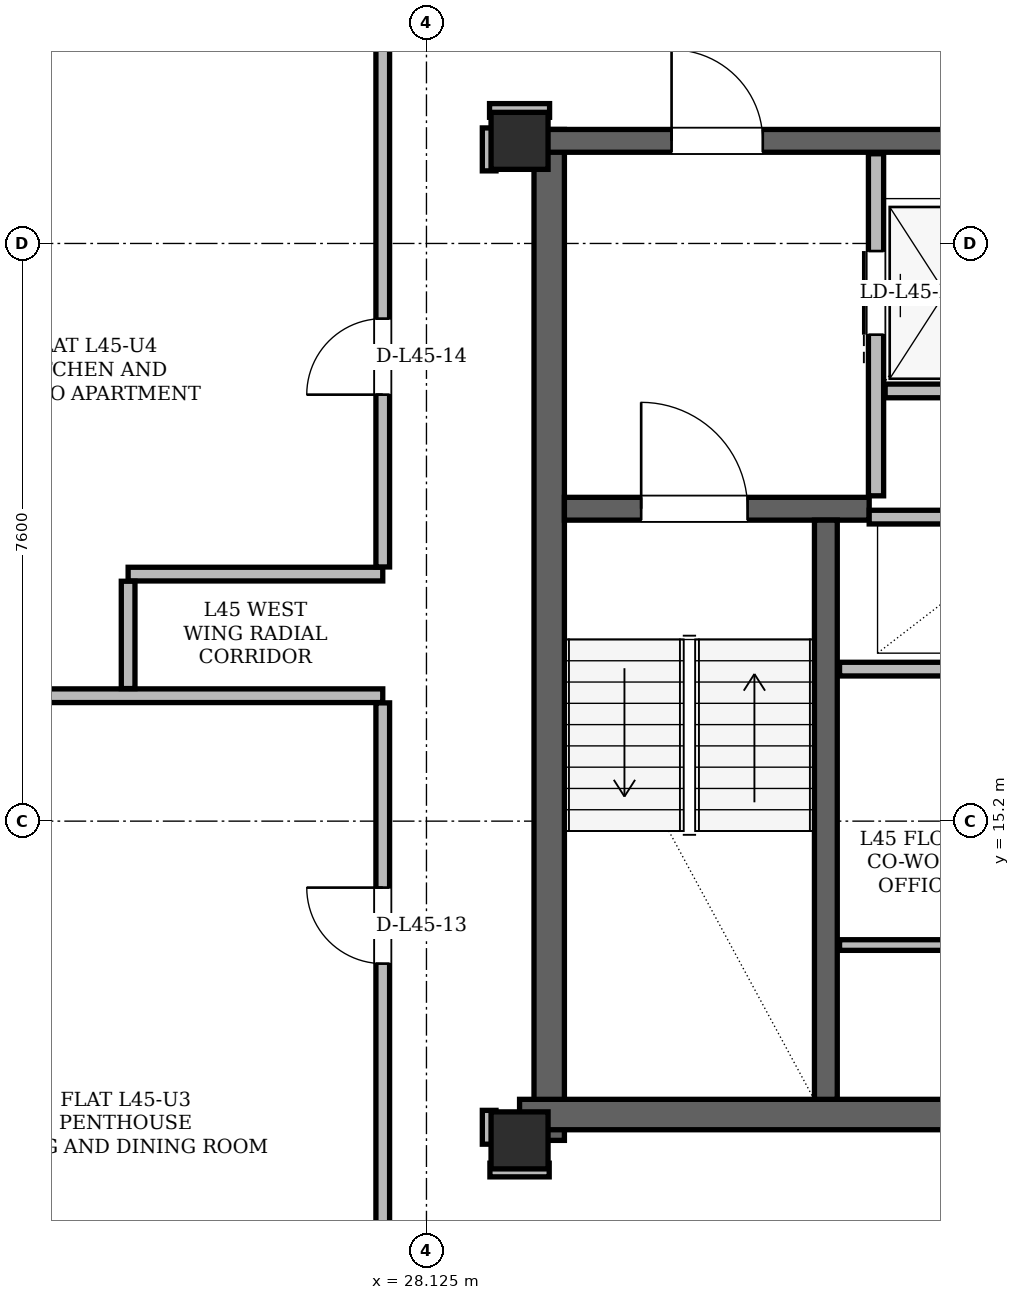
"""IFC4 building model, lengths in metres.
Left out: names, types, materials, properties, quantities, classifications, styles, units other than length and angle.
Written with IfcOpenShell. Run it as: python <this file> out.ifc"""

import sys

from ifc_helpers import new_model, si_unit, direction, frame, frame_2d, origin, origin_2d, place, context, subcontext, project, spatial, rectangle, hollow_rectangle, extrude, element, fill, save


model = new_model("IFC4")
c1 = context("Model", 3, precision=1e-05, world=origin(), true_north=direction((0.0, 1.0)))
c2 = subcontext(c1, "Body", "Model", "MODEL_VIEW")
j1 = project(units=[si_unit("LENGTHUNIT", "METRE"), si_unit("PLANEANGLEUNIT", "RADIAN")], contexts=[c1])
p1 = place(None, origin())
s1 = spatial("IfcSite", under=j1, at=p1, CompositionType="ELEMENT")
p2 = place(p1, origin())
s2 = spatial("IfcBuilding", under=s1, at=p2, CompositionType="ELEMENT")
p3 = place(p2, frame((0.0, 0.0, 171.0)))
s3 = spatial("IfcBuildingStorey", under=s2, at=p3, CompositionType="ELEMENT", Elevation=171.0)
for number, where, z_axis, x_axis in (
    (1, (29.35, 11.0, 0.0), (0.0, 0.0, 1.0), (1.0, 0.0, 0.0)),
    (2, (29.35, 24.15, 0.0), (0.0, 0.0, 1.0), (1.0, 0.0, 0.0)),
):
    element("IfcColumn", number, at=place(p3, frame(where, z_axis=z_axis, x_axis=x_axis)), inside=s3, PredefinedType="COLUMN", context=c2, shape_type="SweptSolid", body=[
        extrude(hollow_rectangle(XDim=0.75, YDim=0.75, WallThickness=0.06, at=origin_2d()), origin(), (0.0, 0.0, 1.0), 3.6),
    ])
p4 = place(p3, frame((29.74, 11.0, 0.0), z_axis=(0.0, 0.0, 1.0), x_axis=(0.0, 1.0, 0.0)))
e3 = element("IfcWall", 3, at=p4, inside=s3, PredefinedType="SHEAR", context=c2, shape_type="SweptSolid", body=[
    extrude(rectangle(XDim=13.3, YDim=0.4, at=frame_2d((6.65, 0.0))), origin(), (0.0, 0.0, 1.0), 3.38),
])
p5 = place(p3, frame((29.35, 11.34, 0.0), z_axis=(0.0, 0.0, 1.0), x_axis=(1.0, 0.0, 0.0)))
e4 = element("IfcWall", 4, at=p5, inside=s3, PredefinedType="SHEAR", context=c2, shape_type="SweptSolid", body=[
    extrude(rectangle(XDim=7.1, YDim=0.4, at=frame_2d((3.55, 0.0))), origin(), (0.0, 0.0, 1.0), 3.38),
])
p6 = place(p3, frame((29.65, 24.15, 0.0), z_axis=(0.0, 0.0, 1.0), x_axis=(1.0, 0.0, 0.0)))
e5 = element("IfcWall", 5, at=p6, inside=s3, PredefinedType="SHEAR", context=c2, shape_type="SweptSolid", body=[
    extrude(rectangle(XDim=15.7, YDim=0.3, at=frame_2d((7.85, 0.0))), origin(), (0.0, 0.0, 1.0), 3.38),
])
p7 = place(p6, frame((1.7, 0.0, 0.0)))
e6 = element("IfcOpeningElement", 6, at=p7, cuts=e5, PredefinedType="OPENING", context=c2, shape_type="SweptSolid", body=[
    extrude(rectangle(XDim=1.2, YDim=2.2, at=frame_2d((0.6, 1.1))), frame((0.0, 0.15, 0.0), z_axis=(0.0, -1.0, 0.0), x_axis=(1.0, 0.0, 0.0)), (0.0, 0.0, 1.0), 0.3),
])
p8 = place(p6, frame((12.8, 0.0, 0.0)))
e7 = element("IfcOpeningElement", 7, at=p8, cuts=e5, PredefinedType="OPENING", context=c2, shape_type="SweptSolid", body=[
    extrude(rectangle(XDim=1.2, YDim=2.2, at=frame_2d((0.6, 1.1))), frame((0.0, 0.15, 0.0), z_axis=(0.0, -1.0, 0.0), x_axis=(1.0, 0.0, 0.0)), (0.0, 0.0, 1.0), 0.3),
])
p9 = place(p6, frame((7.4, 0.0, 0.0)))
e8 = element("IfcOpeningElement", 8, at=p9, cuts=e5, PredefinedType="OPENING", context=c2, shape_type="SweptSolid", body=[
    extrude(rectangle(XDim=0.9, YDim=2.05, at=frame_2d((0.45, 1.025))), frame((0.0, 0.15, 0.0), z_axis=(0.0, -1.0, 0.0), x_axis=(1.0, 0.0, 0.0)), (0.0, 0.0, 1.0), 0.3),
])
p10 = place(p3, frame((29.94, 19.31, 0.0), z_axis=(0.0, 0.0, 1.0), x_axis=(1.0, 0.0, 0.0)))
e9 = element("IfcWall", 9, at=p10, inside=s3, PredefinedType="SHEAR", context=c2, shape_type="SweptSolid", body=[
    extrude(rectangle(XDim=4.01, YDim=0.3, at=frame_2d((2.005, 0.0))), origin(), (0.0, 0.0, 1.0), 3.38),
])
p11 = place(p10, frame((1.01, 0.0, 0.0)))
e10 = element("IfcOpeningElement", 10, at=p11, cuts=e9, PredefinedType="OPENING", context=c2, shape_type="SweptSolid", body=[
    extrude(rectangle(XDim=1.4, YDim=2.2, at=frame_2d((0.7, 1.1))), frame((0.0, 0.15, 0.0), z_axis=(0.0, -1.0, 0.0), x_axis=(1.0, 0.0, 0.0)), (0.0, 0.0, 1.0), 0.3),
])
p12 = place(p3, frame((33.38, 11.54, 0.0), z_axis=(0.0, 0.0, 1.0), x_axis=(0.0, 1.0, 0.0)))
e11 = element("IfcWall", 11, at=p12, inside=s3, PredefinedType="SHEAR", context=c2, shape_type="SweptSolid", body=[
    extrude(rectangle(XDim=7.62, YDim=0.3, at=frame_2d((3.81, 0.0))), origin(), (0.0, 0.0, 1.0), 3.38),
])
p13 = place(p3, frame((33.226, 43.275, 0.0), z_axis=(0.0, 0.0, 1.0), x_axis=(-0.499997229411, -0.866027003379, 0.0)))
e12 = element("IfcWall", 12, at=p13, inside=s3, PredefinedType="SOLIDWALL", context=c2, shape_type="SweptSolid", body=[
    extrude(rectangle(XDim=35.866, YDim=0.29, at=frame_2d((17.933, 0.0))), origin(), (0.0, 0.0, 1.0), 2.6),
])
p14 = place(p13, frame((8.034, 0.0, 0.0)))
e13 = element("IfcOpeningElement", 13, at=p14, cuts=e12, PredefinedType="OPENING", context=c2, shape_type="SweptSolid", body=[
    extrude(rectangle(XDim=1.5, YDim=2.2, at=frame_2d((0.75, 1.1))), frame((0.0, 0.145, 0.0), z_axis=(0.0, -1.0, 0.0), x_axis=(1.0, 0.0, 0.0)), (0.0, 0.0, 1.0), 0.29),
])
p15 = place(p13, frame((27.787, 0.0, 0.0)))
e14 = element("IfcOpeningElement", 14, at=p15, cuts=e12, PredefinedType="OPENING", context=c2, shape_type="SweptSolid", body=[
    extrude(rectangle(XDim=1.5, YDim=2.2, at=frame_2d((0.75, 1.1))), frame((0.0, 0.145, 0.0), z_axis=(0.0, -1.0, 0.0), x_axis=(1.0, 0.0, 0.0)), (0.0, 0.0, 1.0), 0.29),
])
p16 = place(p13, frame((33.63, 0.0, 0.85)))
e15 = element("IfcOpeningElement", 15, at=p16, cuts=e12, PredefinedType="OPENING", context=c2, shape_type="SweptSolid", body=[
    extrude(rectangle(XDim=1.2, YDim=1.48, at=frame_2d((0.6, 0.74))), frame((0.0, 0.145, 0.0), z_axis=(0.0, -1.0, 0.0), x_axis=(1.0, 0.0, 0.0)), (0.0, 0.0, 1.0), 0.29),
])
p17 = place(p13, frame((18.03, 0.0, 0.85)))
e16 = element("IfcOpeningElement", 16, at=p17, cuts=e12, PredefinedType="OPENING", context=c2, shape_type="SweptSolid", body=[
    extrude(rectangle(XDim=2.6, YDim=1.64, at=frame_2d((1.3, 0.82))), frame((0.0, 0.145, 0.0), z_axis=(0.0, -1.0, 0.0), x_axis=(1.0, 0.0, 0.0)), (0.0, 0.0, 1.0), 0.29),
])
p18 = place(p13, frame((26.121, 0.0, 0.85)))
e17 = element("IfcOpeningElement", 17, at=p18, cuts=e12, PredefinedType="OPENING", context=c2, shape_type="SweptSolid", body=[
    extrude(rectangle(XDim=1.2, YDim=1.48, at=frame_2d((0.6, 0.74))), frame((0.0, 0.145, 0.0), z_axis=(0.0, -1.0, 0.0), x_axis=(1.0, 0.0, 0.0)), (0.0, 0.0, 1.0), 0.29),
])
p19 = place(p13, frame((12.379, 0.0, 0.85)))
e18 = element("IfcOpeningElement", 18, at=p19, cuts=e12, PredefinedType="OPENING", context=c2, shape_type="SweptSolid", body=[
    extrude(rectangle(XDim=1.2, YDim=1.48, at=frame_2d((0.6, 0.74))), frame((0.0, 0.145, 0.0), z_axis=(0.0, -1.0, 0.0), x_axis=(1.0, 0.0, 0.0)), (0.0, 0.0, 1.0), 0.29),
])
p20 = place(p13, frame((14.675, 0.0, 0.85)))
e19 = element("IfcOpeningElement", 19, at=p20, cuts=e12, PredefinedType="OPENING", context=c2, shape_type="SweptSolid", body=[
    extrude(rectangle(XDim=1.8, YDim=1.64, at=frame_2d((0.9, 0.82))), frame((0.0, 0.145, 0.0), z_axis=(0.0, -1.0, 0.0), x_axis=(1.0, 0.0, 0.0)), (0.0, 0.0, 1.0), 0.29),
])
p21 = place(p13, frame((2.162, 0.0, 0.85)))
e20 = element("IfcOpeningElement", 20, at=p21, cuts=e12, PredefinedType="OPENING", context=c2, shape_type="SweptSolid", body=[
    extrude(rectangle(XDim=2.0, YDim=1.64, at=frame_2d((1.0, 0.82))), frame((0.0, 0.145, 0.0), z_axis=(0.0, -1.0, 0.0), x_axis=(1.0, 0.0, 0.0)), (0.0, 0.0, 1.0), 0.29),
])
p22 = place(p3, frame((34.04, 19.48, 0.0), z_axis=(0.0, 0.0, 1.0), x_axis=(0.0, 1.0, 0.0)))
e21 = element("IfcWall", 21, at=p22, inside=s3, PredefinedType="PARTITIONING", context=c2, shape_type="SweptSolid", body=[
    extrude(rectangle(XDim=4.5, YDim=0.2, at=frame_2d((2.25, 0.0))), origin(), (0.0, 0.0, 1.0), 3.38),
])
p23 = place(p22, frame((2.12, 0.0, 0.0)))
e22 = element("IfcOpeningElement", 22, at=p23, cuts=e21, PredefinedType="OPENING", context=c2, shape_type="SweptSolid", body=[
    extrude(rectangle(XDim=1.1, YDim=2.2, at=frame_2d((0.55, 1.1))), frame((0.0, 0.1, 0.0), z_axis=(0.0, -1.0, 0.0), x_axis=(1.0, 0.0, 0.0)), (0.0, 0.0, 1.0), 0.2),
])
p24 = place(p3, frame((34.16, 20.86, 0.0), z_axis=(0.0, 0.0, 1.0), x_axis=(1.0, 0.0, 0.0)))
e23 = element("IfcWall", 23, at=p24, inside=s3, PredefinedType="PARTITIONING", context=c2, shape_type="SweptSolid", body=[
    extrude(rectangle(XDim=1.58, YDim=0.18, at=frame_2d((0.79, 0.0))), origin(), (0.0, 0.0, 1.0), 3.38),
])
p25 = place(p3, frame((33.95, 19.2, 0.0), z_axis=(0.0, 0.0, 1.0), x_axis=(1.0, 0.0, 0.0)))
e24 = element("IfcWall", 24, at=p25, inside=s3, PredefinedType="PARTITIONING", context=c2, shape_type="SweptSolid", body=[
    extrude(rectangle(XDim=2.27, YDim=0.18, at=frame_2d((1.135, 0.0))), origin(), (0.0, 0.0, 1.0), 3.38),
])
p26 = place(p3, frame((33.56, 17.2, 0.0), z_axis=(0.0, 0.0, 1.0), x_axis=(1.0, 0.0, 0.0)))
e25 = element("IfcWall", 25, at=p26, inside=s3, PredefinedType="PARTITIONING", context=c2, shape_type="SweptSolid", body=[
    extrude(rectangle(XDim=2.66, YDim=0.18, at=frame_2d((1.33, 0.0))), origin(), (0.0, 0.0, 1.0), 3.38),
])
p27 = place(p3, frame((33.56, 13.57, 0.0), z_axis=(0.0, 0.0, 1.0), x_axis=(1.0, 0.0, 0.0)))
e26 = element("IfcWall", 26, at=p27, inside=s3, PredefinedType="PARTITIONING", context=c2, shape_type="SweptSolid", body=[
    extrude(rectangle(XDim=2.66, YDim=0.14, at=frame_2d((1.33, 0.0))), origin(), (0.0, 0.0, 1.0), 3.38),
])
p28 = place(p3, frame((28.96, 10.61, 0.0), z_axis=(0.0, 0.0, 1.0), x_axis=(1.0, 0.0, 0.0)))
e27 = element("IfcWall", 27, at=p28, inside=s3, PredefinedType="PARTITIONING", context=c2, shape_type="SweptSolid", body=[
    extrude(rectangle(XDim=0.78, YDim=0.18, at=frame_2d((0.39, 0.0))), origin(), (0.0, 0.0, 1.0), 3.38),
])
p29 = place(p3, frame((18.141, 16.85, 0.0), z_axis=(0.0, 0.0, 1.0), x_axis=(1.0, 0.0, 0.0)))
e28 = element("IfcWall", 28, at=p29, inside=s3, PredefinedType="PARTITIONING", context=c2, shape_type="SweptSolid", body=[
    extrude(rectangle(XDim=9.409, YDim=0.18, at=frame_2d((4.705, 0.0))), origin(), (0.0, 0.0, 1.0), 3.38),
])
p30 = place(p3, frame((24.2, 18.45, 0.0), z_axis=(0.0, 0.0, 1.0), x_axis=(1.0, 0.0, 0.0)))
e29 = element("IfcWall", 29, at=p30, inside=s3, PredefinedType="PARTITIONING", context=c2, shape_type="SweptSolid", body=[
    extrude(rectangle(XDim=3.35, YDim=0.18, at=frame_2d((1.675, 0.0))), origin(), (0.0, 0.0, 1.0), 3.38),
])
p31 = place(p3, frame((28.955, 24.55, 0.0), z_axis=(0.0, 0.0, 1.0), x_axis=(1.0, 0.0, 0.0)))
e30 = element("IfcWall", 30, at=p31, inside=s3, PredefinedType="PARTITIONING", context=c2, shape_type="SweptSolid", body=[
    extrude(rectangle(XDim=0.79, YDim=0.18, at=frame_2d((0.395, 0.0))), origin(), (0.0, 0.0, 1.0), 2.842),
])
p32 = place(p3, frame((24.2, 16.944, 0.0), z_axis=(0.0, 0.0, 1.0), x_axis=(0.0, 1.0, 0.0)))
e31 = element("IfcWall", 31, at=p32, inside=s3, PredefinedType="PARTITIONING", context=c2, shape_type="SweptSolid", body=[
    extrude(rectangle(XDim=1.412, YDim=0.18, at=frame_2d((0.706, 0.0))), origin(), (0.0, 0.0, 1.0), 3.38),
])
p33 = place(p3, frame((27.55, 4.96, 0.0), z_axis=(0.0, 0.0, 1.0), x_axis=(0.0, 1.0, 0.0)))
e32 = element("IfcWall", 32, at=p33, inside=s3, PredefinedType="PARTITIONING", context=c2, shape_type="SweptSolid", body=[
    extrude(rectangle(XDim=11.796, YDim=0.18, at=frame_2d((5.898, 0.0))), origin(), (0.0, 0.0, 1.0), 2.842),
])
p34 = place(p33, frame((8.366, 0.0, 0.0)))
e33 = element("IfcOpeningElement", 33, at=p34, cuts=e32, PredefinedType="OPENING", context=c2, shape_type="SweptSolid", body=[
    extrude(rectangle(XDim=1.0, YDim=2.18, at=frame_2d((0.5, 1.09))), frame((0.0, 0.09, 0.0), z_axis=(0.0, -1.0, 0.0), x_axis=(1.0, 0.0, 0.0)), (0.0, 0.0, 1.0), 0.18),
])
p35 = place(p3, frame((27.55, 18.544, 0.0), z_axis=(0.0, 0.0, 1.0), x_axis=(0.0, 1.0, 0.0)))
e34 = element("IfcWall", 34, at=p35, inside=s3, PredefinedType="PARTITIONING", context=c2, shape_type="SweptSolid", body=[
    extrude(rectangle(XDim=14.603, YDim=0.18, at=frame_2d((7.302, 0.0))), origin(), (0.0, 0.0, 1.0), 3.38),
])
p36 = place(p35, frame((2.267, 0.0, 0.0)))
e35 = element("IfcOpeningElement", 35, at=p36, cuts=e34, PredefinedType="OPENING", context=c2, shape_type="SweptSolid", body=[
    extrude(rectangle(XDim=1.0, YDim=2.18, at=frame_2d((0.5, 1.09))), frame((0.0, 0.09, 0.0), z_axis=(0.0, -1.0, 0.0), x_axis=(1.0, 0.0, 0.0)), (0.0, 0.0, 1.0), 0.18),
])
p37 = place(p3, frame((28.95, 10.95, 0.0), z_axis=(0.0, 0.0, 1.0), x_axis=(0.0, 1.0, 0.0)))
e36 = element("IfcWall", 36, at=p37, inside=s3, PredefinedType="PARTITIONING", context=c2, shape_type="SweptSolid", body=[
    extrude(rectangle(XDim=0.445, YDim=0.18, at=frame_2d((0.223, 0.0))), origin(), (0.0, 0.0, 1.0), 2.842),
])
p38 = place(p3, frame((28.95, 23.755, 0.0), z_axis=(0.0, 0.0, 1.0), x_axis=(0.0, 1.0, 0.0)))
e37 = element("IfcWall", 37, at=p38, inside=s3, PredefinedType="PARTITIONING", context=c2, shape_type="SweptSolid", body=[
    extrude(rectangle(XDim=0.565, YDim=0.18, at=frame_2d((0.283, 0.0))), origin(), (0.0, 0.0, 1.0), 3.38),
])
p39 = place(p23, origin())
e38 = element("IfcDoor", 38, at=p39, inside=s3, OperationType="SLIDING_TO_LEFT", PredefinedType="DOOR", context=c2, shape_type="SweptSolid", body=[
    extrude(rectangle(XDim=1.1, YDim=2.2, at=frame_2d((0.55, 1.1))), frame((0.0, 0.025, 0.0), z_axis=(0.0, -1.0, 0.0), x_axis=(1.0, 0.0, 0.0)), (0.0, 0.0, 1.0), 0.05),
])
fill(e22, e38)
p40 = place(p11, origin())
e39 = element("IfcDoor", 39, at=p40, inside=s3, OperationType="SINGLE_SWING_LEFT", PredefinedType="DOOR", context=c2, shape_type="SweptSolid", body=[
    extrude(rectangle(XDim=1.4, YDim=2.2, at=frame_2d((0.7, 1.1))), frame((0.0, 0.025, 0.0), z_axis=(0.0, -1.0, 0.0), x_axis=(1.0, 0.0, 0.0)), (0.0, 0.0, 1.0), 0.05),
])
fill(e10, e39)
p41 = place(p7, origin())
e40 = element("IfcDoor", 40, at=p41, inside=s3, OperationType="SINGLE_SWING_LEFT", PredefinedType="DOOR", context=c2, shape_type="SweptSolid", body=[
    extrude(rectangle(XDim=1.2, YDim=2.2, at=frame_2d((0.6, 1.1))), frame((0.0, 0.025, 0.0), z_axis=(0.0, -1.0, 0.0), x_axis=(1.0, 0.0, 0.0)), (0.0, 0.0, 1.0), 0.05),
])
fill(e6, e40)
p42 = place(p34, origin())
e41 = element("IfcDoor", 41, at=p42, inside=s3, OperationType="SINGLE_SWING_RIGHT", PredefinedType="DOOR", context=c2, shape_type="SweptSolid", body=[
    extrude(rectangle(XDim=1.0, YDim=2.18, at=frame_2d((0.5, 1.09))), frame((0.0, 0.025, 0.0), z_axis=(0.0, -1.0, 0.0), x_axis=(1.0, 0.0, 0.0)), (0.0, 0.0, 1.0), 0.05),
])
fill(e33, e41)
p43 = place(p36, origin())
e42 = element("IfcDoor", 42, at=p43, inside=s3, OperationType="SINGLE_SWING_LEFT", PredefinedType="DOOR", context=c2, shape_type="SweptSolid", body=[
    extrude(rectangle(XDim=1.0, YDim=2.18, at=frame_2d((0.5, 1.09))), frame((0.0, 0.025, 0.0), z_axis=(0.0, -1.0, 0.0), x_axis=(1.0, 0.0, 0.0)), (0.0, 0.0, 1.0), 0.05),
])
fill(e35, e42)
save(model, sys.argv[1])
